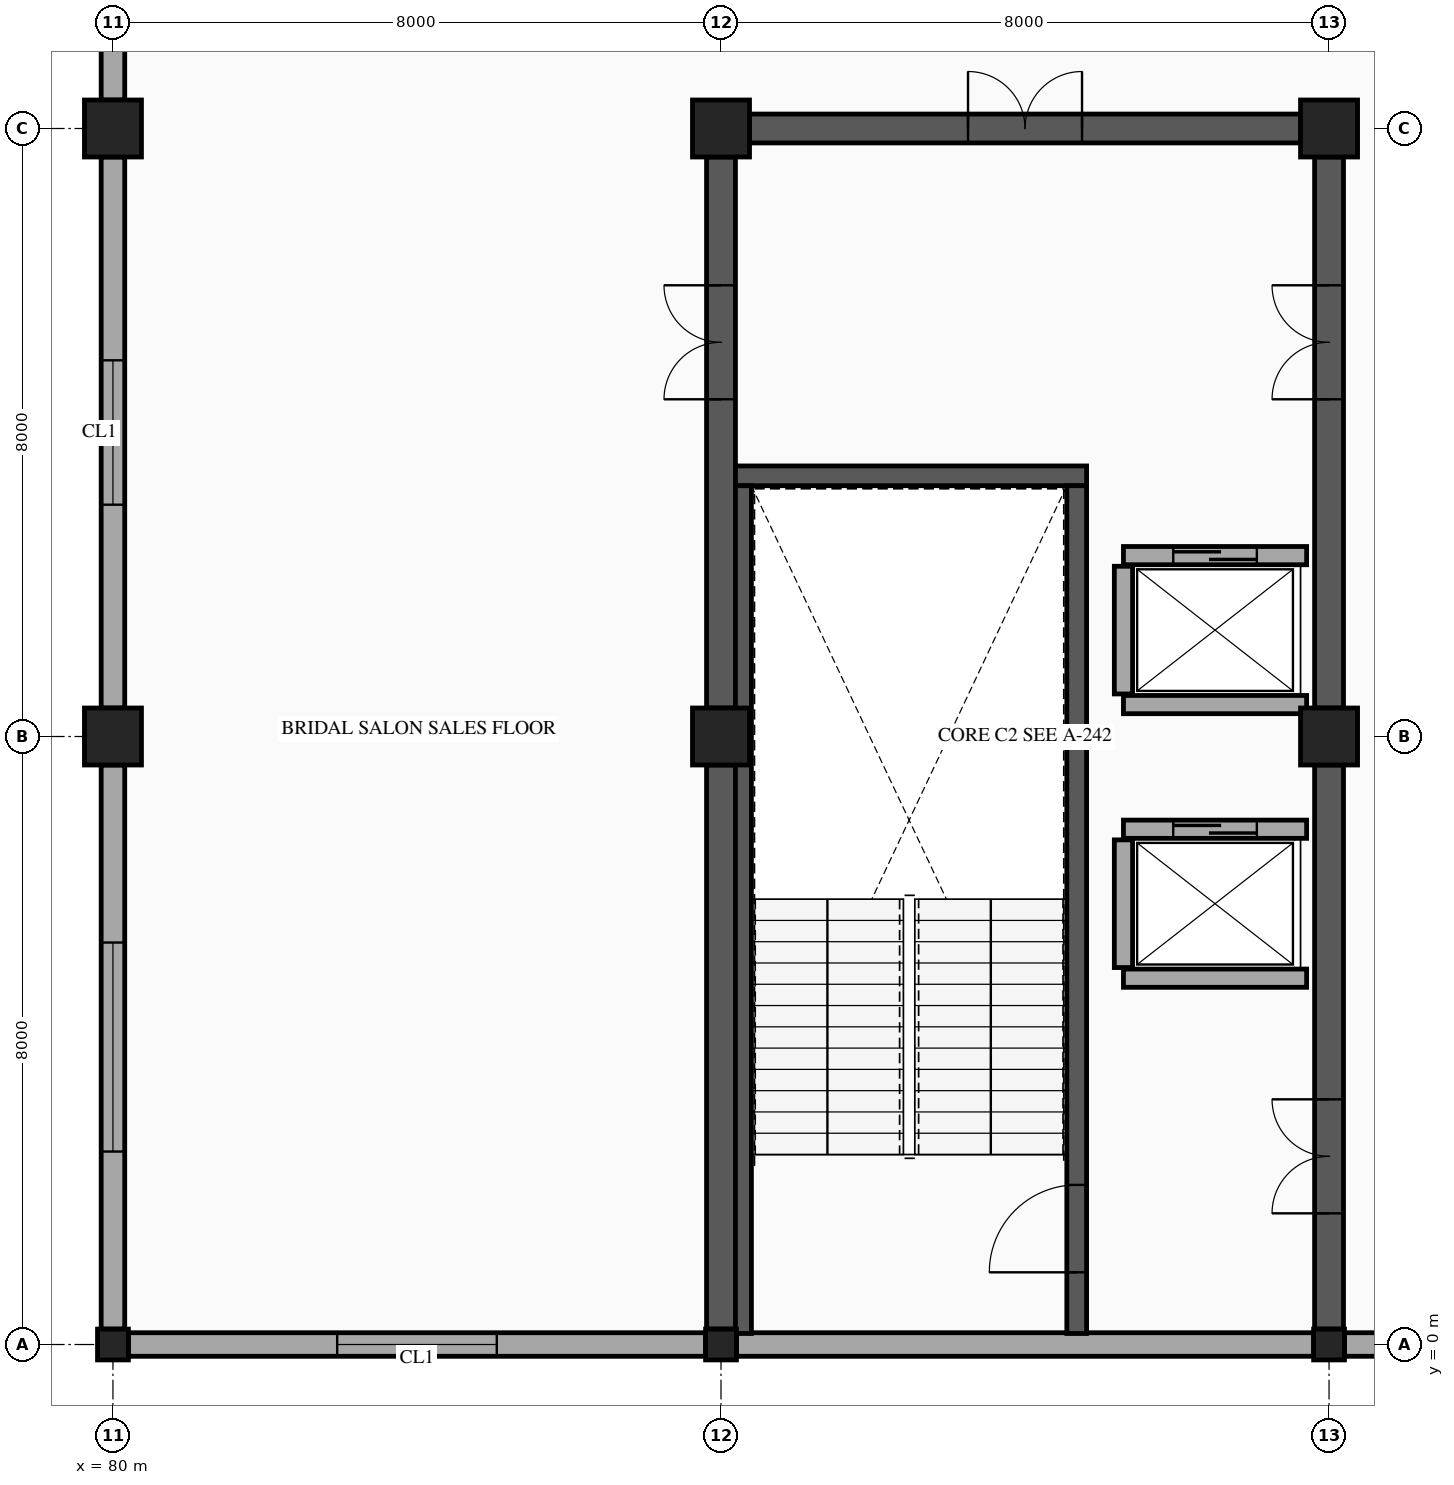
"""IFC4 building model, lengths in metres.
Left out: names, types, materials, properties, quantities, classifications, styles, units other than length and angle.
Written with IfcOpenShell. Run it as: python <this file> out.ifc"""

import sys

from ifc_helpers import new_model, si_unit, direction, frame, frame_2d, origin, origin_2d, place, context, subcontext, project, spatial, rectangle, hollow_rectangle, extrude, element, fill, save


model = new_model("IFC4")
c1 = context("Model", 3, precision=1e-05, world=origin(), true_north=direction((0.0, 1.0)))
c2 = subcontext(c1, "Body", "Model", "MODEL_VIEW")
j1 = project(units=[si_unit("LENGTHUNIT", "METRE"), si_unit("PLANEANGLEUNIT", "RADIAN")], contexts=[c1])
p1 = place(None, origin())
s1 = spatial("IfcSite", under=j1, at=p1, CompositionType="ELEMENT")
p2 = place(p1, origin())
s2 = spatial("IfcBuilding", under=s1, at=p2, CompositionType="ELEMENT")
p3 = place(p2, frame((0.0, 0.0, 14.9)))
s3 = spatial("IfcBuildingStorey", under=s2, at=p3, CompositionType="ELEMENT", Elevation=14.9)
p4 = place(p3, frame((80.0, 0.0, 0.0), z_axis=(0.0, 0.0, 1.0), x_axis=(1.0, 0.0, 0.0)))
e1 = element("IfcColumn", 1, at=p4, inside=s3, PredefinedType="COLUMN", context=c2, shape_type="SweptSolid", body=[
    extrude(hollow_rectangle(XDim=0.406, YDim=0.406, WallThickness=0.015, InnerFilletRadius=0.015, OuterFilletRadius=0.029, at=origin_2d()), origin(), (0.0, 0.0, 1.0), 4.5),
])
for number, where, z_axis, x_axis in (
    (2, (80.0, 8.0, 0.0), (0.0, 0.0, 1.0), (1.0, 0.0, 0.0)),
    (3, (80.0, 16.0, 0.0), (0.0, 0.0, 1.0), (1.0, 0.0, 0.0)),
):
    element("IfcColumn", number, at=place(p3, frame(where, z_axis=z_axis, x_axis=x_axis)), inside=s3, PredefinedType="COLUMN", context=c2, shape_type="SweptSolid", body=[
        extrude(rectangle(XDim=0.75, YDim=0.75, at=origin_2d()), origin(), (0.0, 0.0, 1.0), 4.5),
    ])
p5 = place(p3, frame((88.0, 0.0, 0.0), z_axis=(0.0, 0.0, 1.0), x_axis=(1.0, 0.0, 0.0)))
e4 = element("IfcColumn", 4, at=p5, inside=s3, PredefinedType="COLUMN", context=c2, shape_type="SweptSolid", body=[
    extrude(hollow_rectangle(XDim=0.406, YDim=0.406, WallThickness=0.015, InnerFilletRadius=0.015, OuterFilletRadius=0.029, at=origin_2d()), origin(), (0.0, 0.0, 1.0), 4.5),
])
for number, where, z_axis, x_axis in (
    (5, (88.0, 8.0, 0.0), (0.0, 0.0, 1.0), (1.0, 0.0, 0.0)),
    (6, (88.0, 16.0, 0.0), (0.0, 0.0, 1.0), (1.0, 0.0, 0.0)),
):
    element("IfcColumn", number, at=place(p3, frame(where, z_axis=z_axis, x_axis=x_axis)), inside=s3, PredefinedType="COLUMN", context=c2, shape_type="SweptSolid", body=[
        extrude(rectangle(XDim=0.75, YDim=0.75, at=origin_2d()), origin(), (0.0, 0.0, 1.0), 4.5),
    ])
p6 = place(p3, frame((96.0, 0.0, 0.0), z_axis=(0.0, 0.0, 1.0), x_axis=(1.0, 0.0, 0.0)))
e7 = element("IfcColumn", 7, at=p6, inside=s3, PredefinedType="COLUMN", context=c2, shape_type="SweptSolid", body=[
    extrude(hollow_rectangle(XDim=0.406, YDim=0.406, WallThickness=0.015, InnerFilletRadius=0.015, OuterFilletRadius=0.029, at=origin_2d()), origin(), (0.0, 0.0, 1.0), 4.5),
])
for number, where, z_axis, x_axis in (
    (8, (96.0, 8.0, 0.0), (0.0, 0.0, 1.0), (1.0, 0.0, 0.0)),
    (9, (96.0, 16.0, 0.0), (0.0, 0.0, 1.0), (1.0, 0.0, 0.0)),
):
    element("IfcColumn", number, at=place(p3, frame(where, z_axis=z_axis, x_axis=x_axis)), inside=s3, PredefinedType="COLUMN", context=c2, shape_type="SweptSolid", body=[
        extrude(rectangle(XDim=0.75, YDim=0.75, at=origin_2d()), origin(), (0.0, 0.0, 1.0), 4.5),
    ])
p7 = place(p3, frame((103.797, 0.0, 0.0), z_axis=(0.0, 0.0, 1.0), x_axis=(-1.0, 0.0, 0.0)))
e10 = element("IfcWall", 10, at=p7, inside=s3, PredefinedType="STANDARD", context=c2, shape_type="SweptSolid", body=[
    extrude(rectangle(XDim=7.594, YDim=0.31, at=frame_2d((3.797, 0.0))), origin(), (0.0, 0.0, 1.0), 3.48),
])
p8 = place(p7, frame((2.747, 0.0, 0.8)))
e11 = element("IfcOpeningElement", 11, at=p8, cuts=e10, PredefinedType="OPENING", context=c2, shape_type="SweptSolid", body=[
    extrude(rectangle(XDim=2.1, YDim=1.9, at=frame_2d((1.05, 0.95))), frame((0.0, 0.165, 0.0), z_axis=(0.0, -1.0, 0.0), x_axis=(1.0, 0.0, 0.0)), (0.0, 0.0, 1.0), 0.33),
])
p9 = place(p3, frame((95.797, 0.0, 0.0), z_axis=(0.0, 0.0, 1.0), x_axis=(-1.0, 0.0, 0.0)))
e12 = element("IfcWall", 12, at=p9, inside=s3, PredefinedType="STANDARD", context=c2, shape_type="SweptSolid", body=[
    extrude(rectangle(XDim=7.594, YDim=0.31, at=frame_2d((3.797, 0.0))), origin(), (0.0, 0.0, 1.0), 3.48),
])
p10 = place(p3, frame((87.797, 0.0, 0.0), z_axis=(0.0, 0.0, 1.0), x_axis=(-1.0, 0.0, 0.0)))
e13 = element("IfcWall", 13, at=p10, inside=s3, PredefinedType="STANDARD", context=c2, shape_type="SweptSolid", body=[
    extrude(rectangle(XDim=7.594, YDim=0.31, at=frame_2d((3.797, 0.0))), origin(), (0.0, 0.0, 1.0), 3.48),
])
p11 = place(p10, frame((2.747, 0.0, 0.8)))
e14 = element("IfcOpeningElement", 14, at=p11, cuts=e13, PredefinedType="OPENING", context=c2, shape_type="SweptSolid", body=[
    extrude(rectangle(XDim=2.1, YDim=1.9, at=frame_2d((1.05, 0.95))), frame((0.0, 0.165, 0.0), z_axis=(0.0, -1.0, 0.0), x_axis=(1.0, 0.0, 0.0)), (0.0, 0.0, 1.0), 0.33),
])
p12 = place(p3, frame((80.0, 0.203, 0.0), z_axis=(0.0, 0.0, 1.0), x_axis=(0.0, 1.0, 0.0)))
e15 = element("IfcWall", 15, at=p12, inside=s3, PredefinedType="STANDARD", context=c2, shape_type="SweptSolid", body=[
    extrude(rectangle(XDim=7.422, YDim=0.31, at=frame_2d((3.711, 0.0))), origin(), (0.0, 0.0, 1.0), 3.48),
])
p13 = place(p12, frame((2.336, 0.0, 0.8)))
e16 = element("IfcOpeningElement", 16, at=p13, cuts=e15, PredefinedType="OPENING", context=c2, shape_type="SweptSolid", body=[
    extrude(rectangle(XDim=2.75, YDim=2.15, at=frame_2d((1.375, 1.075))), frame((0.0, 0.165, 0.0), z_axis=(0.0, -1.0, 0.0), x_axis=(1.0, 0.0, 0.0)), (0.0, 0.0, 1.0), 0.33),
])
p14 = place(p3, frame((80.0, 8.375, 0.0), z_axis=(0.0, 0.0, 1.0), x_axis=(0.0, 1.0, 0.0)))
e17 = element("IfcWall", 17, at=p14, inside=s3, PredefinedType="STANDARD", context=c2, shape_type="SweptSolid", body=[
    extrude(rectangle(XDim=7.25, YDim=0.31, at=frame_2d((3.625, 0.0))), origin(), (0.0, 0.0, 1.0), 3.48),
])
p15 = place(p14, frame((2.675, 0.0, 0.8)))
e18 = element("IfcOpeningElement", 18, at=p15, cuts=e17, PredefinedType="OPENING", context=c2, shape_type="SweptSolid", body=[
    extrude(rectangle(XDim=1.9, YDim=1.65, at=frame_2d((0.95, 0.825))), frame((0.0, 0.165, 0.0), z_axis=(0.0, -1.0, 0.0), x_axis=(1.0, 0.0, 0.0)), (0.0, 0.0, 1.0), 0.33),
])
p16 = place(p3, frame((80.0, 16.375, 0.0), z_axis=(0.0, 0.0, 1.0), x_axis=(0.0, 1.0, 0.0)))
e19 = element("IfcWall", 19, at=p16, inside=s3, PredefinedType="STANDARD", context=c2, shape_type="SweptSolid", body=[
    extrude(rectangle(XDim=7.3, YDim=0.31, at=frame_2d((3.65, 0.0))), origin(), (0.0, 0.0, 1.0), 3.48),
])
p17 = place(p3, frame((88.14, 11.43, 0.0), z_axis=(0.0, 0.0, 1.0), x_axis=(1.0, 0.0, 0.0)))
e20 = element("IfcWall", 20, at=p17, inside=s3, PredefinedType="SHEAR", context=c2, shape_type="SweptSolid", body=[
    extrude(rectangle(XDim=4.67, YDim=0.26, at=frame_2d((2.335, 0.0))), origin(), (0.0, 0.0, 1.0), 4.28),
])
p18 = place(p3, frame((88.27, 0.145, 0.0), z_axis=(0.0, 0.0, 1.0), x_axis=(0.0, 1.0, 0.0)))
e21 = element("IfcWall", 21, at=p18, inside=s3, PredefinedType="SHEAR", context=c2, shape_type="SweptSolid", body=[
    extrude(rectangle(XDim=11.155, YDim=0.26, at=frame_2d((5.578, 0.0))), origin(), (0.0, 0.0, 1.0), 4.28),
])
p19 = place(p3, frame((92.68, 0.145, 0.0), z_axis=(0.0, 0.0, 1.0), x_axis=(0.0, 1.0, 0.0)))
e22 = element("IfcWall", 22, at=p19, inside=s3, PredefinedType="SHEAR", context=c2, shape_type="SweptSolid", body=[
    extrude(rectangle(XDim=11.155, YDim=0.26, at=frame_2d((5.578, 0.0))), origin(), (0.0, 0.0, 1.0), 4.28),
])
p20 = place(p19, frame((0.805, 0.0, 0.0)))
e23 = element("IfcOpeningElement", 23, at=p20, cuts=e22, PredefinedType="OPENING", context=c2, shape_type="SweptSolid", body=[
    extrude(rectangle(XDim=1.15, YDim=2.15, at=frame_2d((0.575, 1.075))), frame((0.0, 0.14, 0.0), z_axis=(0.0, -1.0, 0.0), x_axis=(1.0, 0.0, 0.0)), (0.0, 0.0, 1.0), 0.28),
])
p21 = place(p3, frame((88.375, 16.0, 0.0), z_axis=(0.0, 0.0, 1.0), x_axis=(1.0, 0.0, 0.0)))
e24 = element("IfcWall", 24, at=p21, inside=s3, PredefinedType="SHEAR", context=c2, shape_type="SweptSolid", body=[
    extrude(rectangle(XDim=7.25, YDim=0.38, at=frame_2d((3.625, 0.0))), origin(), (0.0, 0.0, 1.0), 4.28),
])
p22 = place(p21, frame((2.875, 0.0, 0.0)))
e25 = element("IfcOpeningElement", 25, at=p22, cuts=e24, PredefinedType="OPENING", context=c2, shape_type="SweptSolid", body=[
    extrude(rectangle(XDim=1.5, YDim=2.15, at=frame_2d((0.75, 1.075))), frame((0.0, 0.2, 0.0), z_axis=(0.0, -1.0, 0.0), x_axis=(1.0, 0.0, 0.0)), (0.0, 0.0, 1.0), 0.4),
])
p23 = place(p3, frame((88.0, 0.203, 0.0), z_axis=(0.0, 0.0, 1.0), x_axis=(0.0, 1.0, 0.0)))
e26 = element("IfcWall", 26, at=p23, inside=s3, PredefinedType="SHEAR", context=c2, shape_type="SweptSolid", body=[
    extrude(rectangle(XDim=7.422, YDim=0.38, at=frame_2d((3.711, 0.0))), origin(), (0.0, 0.0, 1.0), 4.28),
])
p24 = place(p3, frame((88.0, 8.375, 0.0), z_axis=(0.0, 0.0, 1.0), x_axis=(0.0, 1.0, 0.0)))
e27 = element("IfcWall", 27, at=p24, inside=s3, PredefinedType="SHEAR", context=c2, shape_type="SweptSolid", body=[
    extrude(rectangle(XDim=7.25, YDim=0.38, at=frame_2d((3.625, 0.0))), origin(), (0.0, 0.0, 1.0), 4.28),
])
p25 = place(p24, frame((4.062, 0.0, 0.0)))
e28 = element("IfcOpeningElement", 28, at=p25, cuts=e27, PredefinedType="OPENING", context=c2, shape_type="SweptSolid", body=[
    extrude(rectangle(XDim=1.5, YDim=2.15, at=frame_2d((0.75, 1.075))), frame((0.0, 0.2, 0.0), z_axis=(0.0, -1.0, 0.0), x_axis=(1.0, 0.0, 0.0)), (0.0, 0.0, 1.0), 0.4),
])
p26 = place(p3, frame((96.0, 0.203, 0.0), z_axis=(0.0, 0.0, 1.0), x_axis=(0.0, 1.0, 0.0)))
e29 = element("IfcWall", 29, at=p26, inside=s3, PredefinedType="SHEAR", context=c2, shape_type="SweptSolid", body=[
    extrude(rectangle(XDim=7.422, YDim=0.38, at=frame_2d((3.711, 0.0))), origin(), (0.0, 0.0, 1.0), 4.28),
])
p27 = place(p26, frame((1.523, 0.0, 0.0)))
e30 = element("IfcOpeningElement", 30, at=p27, cuts=e29, PredefinedType="OPENING", context=c2, shape_type="SweptSolid", body=[
    extrude(rectangle(XDim=1.5, YDim=2.15, at=frame_2d((0.75, 1.075))), frame((0.0, 0.2, 0.0), z_axis=(0.0, -1.0, 0.0), x_axis=(1.0, 0.0, 0.0)), (0.0, 0.0, 1.0), 0.4),
])
p28 = place(p3, frame((96.0, 8.375, 0.0), z_axis=(0.0, 0.0, 1.0), x_axis=(0.0, 1.0, 0.0)))
e31 = element("IfcWall", 31, at=p28, inside=s3, PredefinedType="SHEAR", context=c2, shape_type="SweptSolid", body=[
    extrude(rectangle(XDim=7.25, YDim=0.38, at=frame_2d((3.625, 0.0))), origin(), (0.0, 0.0, 1.0), 4.28),
])
p29 = place(p28, frame((4.062, 0.0, 0.0)))
e32 = element("IfcOpeningElement", 32, at=p29, cuts=e31, PredefinedType="OPENING", context=c2, shape_type="SweptSolid", body=[
    extrude(rectangle(XDim=1.5, YDim=2.15, at=frame_2d((0.75, 1.075))), frame((0.0, 0.2, 0.0), z_axis=(0.0, -1.0, 0.0), x_axis=(1.0, 0.0, 0.0)), (0.0, 0.0, 1.0), 0.4),
])
p30 = place(p3, frame((93.295, 6.78, 0.0), z_axis=(0.0, 0.0, 1.0), x_axis=(1.0, 0.0, 0.0)))
e33 = element("IfcWall", 33, at=p30, inside=s3, PredefinedType="PARTITIONING", context=c2, shape_type="SweptSolid", body=[
    extrude(rectangle(XDim=2.41, YDim=0.24, at=frame_2d((1.205, 0.0))), origin(), (0.0, 0.0, 1.0), 4.28),
])
p31 = place(p30, frame((0.655, 0.0, 0.0)))
e34 = element("IfcOpeningElement", 34, at=p31, cuts=e33, PredefinedType="OPENING", context=c2, shape_type="SweptSolid", body=[
    extrude(rectangle(XDim=1.1, YDim=2.15, at=frame_2d((0.55, 1.075))), frame((0.0, 0.13, 0.0), z_axis=(0.0, -1.0, 0.0), x_axis=(1.0, 0.0, 0.0)), (0.0, 0.0, 1.0), 0.26),
])
p32 = place(p3, frame((93.295, 4.82, 0.0), z_axis=(0.0, 0.0, 1.0), x_axis=(1.0, 0.0, 0.0)))
e35 = element("IfcWall", 35, at=p32, inside=s3, PredefinedType="PARTITIONING", context=c2, shape_type="SweptSolid", body=[
    extrude(rectangle(XDim=2.41, YDim=0.24, at=frame_2d((1.205, 0.0))), origin(), (0.0, 0.0, 1.0), 4.28),
])
p33 = place(p3, frame((93.295, 4.96, 0.0), z_axis=(0.0, 0.0, 1.0), x_axis=(0.0, 1.0, 0.0)))
e36 = element("IfcWall", 36, at=p33, inside=s3, PredefinedType="PARTITIONING", context=c2, shape_type="SweptSolid", body=[
    extrude(rectangle(XDim=1.68, YDim=0.24, at=frame_2d((0.84, 0.0))), origin(), (0.0, 0.0, 1.0), 4.28),
])
p34 = place(p3, frame((93.295, 10.38, 0.0), z_axis=(0.0, 0.0, 1.0), x_axis=(1.0, 0.0, 0.0)))
e37 = element("IfcWall", 37, at=p34, inside=s3, PredefinedType="PARTITIONING", context=c2, shape_type="SweptSolid", body=[
    extrude(rectangle(XDim=2.41, YDim=0.24, at=frame_2d((1.205, 0.0))), origin(), (0.0, 0.0, 1.0), 4.28),
])
p35 = place(p34, frame((0.655, 0.0, 0.0)))
e38 = element("IfcOpeningElement", 38, at=p35, cuts=e37, PredefinedType="OPENING", context=c2, shape_type="SweptSolid", body=[
    extrude(rectangle(XDim=1.1, YDim=2.15, at=frame_2d((0.55, 1.075))), frame((0.0, 0.13, 0.0), z_axis=(0.0, -1.0, 0.0), x_axis=(1.0, 0.0, 0.0)), (0.0, 0.0, 1.0), 0.26),
])
p36 = place(p3, frame((93.295, 8.42, 0.0), z_axis=(0.0, 0.0, 1.0), x_axis=(1.0, 0.0, 0.0)))
e39 = element("IfcWall", 39, at=p36, inside=s3, PredefinedType="PARTITIONING", context=c2, shape_type="SweptSolid", body=[
    extrude(rectangle(XDim=2.41, YDim=0.24, at=frame_2d((1.205, 0.0))), origin(), (0.0, 0.0, 1.0), 4.28),
])
p37 = place(p3, frame((93.295, 8.56, 0.0), z_axis=(0.0, 0.0, 1.0), x_axis=(0.0, 1.0, 0.0)))
e40 = element("IfcWall", 40, at=p37, inside=s3, PredefinedType="PARTITIONING", context=c2, shape_type="SweptSolid", body=[
    extrude(rectangle(XDim=1.68, YDim=0.24, at=frame_2d((0.84, 0.0))), origin(), (0.0, 0.0, 1.0), 4.28),
])
p38 = place(p11, origin())
e41 = element("IfcWindow", 41, at=p38, inside=s3, PartitioningType="DOUBLE_PANEL_VERTICAL", PredefinedType="WINDOW", context=c2, shape_type="SweptSolid", body=[
    extrude(rectangle(XDim=2.1, YDim=1.9, at=frame_2d((1.05, 0.95))), frame((0.0, 0.03, 0.0), z_axis=(0.0, -1.0, 0.0), x_axis=(1.0, 0.0, 0.0)), (0.0, 0.0, 1.0), 0.06),
])
fill(e14, e41)
p39 = place(p13, origin())
e42 = element("IfcWindow", 42, at=p39, inside=s3, PartitioningType="TRIPLE_PANEL_VERTICAL", PredefinedType="WINDOW", context=c2, shape_type="SweptSolid", body=[
    extrude(rectangle(XDim=2.75, YDim=2.15, at=frame_2d((1.375, 1.075))), frame((0.0, 0.03, 0.0), z_axis=(0.0, -1.0, 0.0), x_axis=(1.0, 0.0, 0.0)), (0.0, 0.0, 1.0), 0.06),
])
fill(e16, e42)
p40 = place(p15, origin())
e43 = element("IfcWindow", 43, at=p40, inside=s3, PartitioningType="DOUBLE_PANEL_VERTICAL", PredefinedType="WINDOW", context=c2, shape_type="SweptSolid", body=[
    extrude(rectangle(XDim=1.9, YDim=1.65, at=frame_2d((0.95, 0.825))), frame((0.0, 0.03, 0.0), z_axis=(0.0, -1.0, 0.0), x_axis=(1.0, 0.0, 0.0)), (0.0, 0.0, 1.0), 0.06),
])
fill(e18, e43)
p41 = place(p20, origin())
e44 = element("IfcDoor", 44, at=p41, inside=s3, OperationType="SINGLE_SWING_LEFT", PredefinedType="DOOR", context=c2, shape_type="SweptSolid", body=[
    extrude(rectangle(XDim=1.15, YDim=2.15, at=frame_2d((0.575, 1.075))), frame((0.0, 0.025, 0.0), z_axis=(0.0, -1.0, 0.0), x_axis=(1.0, 0.0, 0.0)), (0.0, 0.0, 1.0), 0.05),
])
fill(e23, e44)
p42 = place(p22, origin())
e45 = element("IfcDoor", 45, at=p42, inside=s3, OperationType="DOUBLE_DOOR_SINGLE_SWING", PredefinedType="DOOR", context=c2, shape_type="SweptSolid", body=[
    extrude(rectangle(XDim=1.5, YDim=2.15, at=frame_2d((0.75, 1.075))), frame((0.0, 0.025, 0.0), z_axis=(0.0, -1.0, 0.0), x_axis=(1.0, 0.0, 0.0)), (0.0, 0.0, 1.0), 0.05),
])
fill(e25, e45)
p43 = place(p25, origin())
e46 = element("IfcDoor", 46, at=p43, inside=s3, OperationType="DOUBLE_DOOR_SINGLE_SWING", PredefinedType="DOOR", context=c2, shape_type="SweptSolid", body=[
    extrude(rectangle(XDim=1.5, YDim=2.15, at=frame_2d((0.75, 1.075))), frame((0.0, 0.025, 0.0), z_axis=(0.0, -1.0, 0.0), x_axis=(1.0, 0.0, 0.0)), (0.0, 0.0, 1.0), 0.05),
])
fill(e28, e46)
p44 = place(p27, origin())
e47 = element("IfcDoor", 47, at=p44, inside=s3, OperationType="DOUBLE_DOOR_SINGLE_SWING", PredefinedType="DOOR", context=c2, shape_type="SweptSolid", body=[
    extrude(rectangle(XDim=1.5, YDim=2.15, at=frame_2d((0.75, 1.075))), frame((0.0, 0.025, 0.0), z_axis=(0.0, -1.0, 0.0), x_axis=(1.0, 0.0, 0.0)), (0.0, 0.0, 1.0), 0.05),
])
fill(e30, e47)
p45 = place(p29, origin())
e48 = element("IfcDoor", 48, at=p45, inside=s3, OperationType="DOUBLE_DOOR_SINGLE_SWING", PredefinedType="DOOR", context=c2, shape_type="SweptSolid", body=[
    extrude(rectangle(XDim=1.5, YDim=2.15, at=frame_2d((0.75, 1.075))), frame((0.0, 0.025, 0.0), z_axis=(0.0, -1.0, 0.0), x_axis=(1.0, 0.0, 0.0)), (0.0, 0.0, 1.0), 0.05),
])
fill(e32, e48)
p46 = place(p31, origin())
e49 = element("IfcDoor", 49, at=p46, inside=s3, OperationType="SLIDING_TO_LEFT", PredefinedType="DOOR", context=c2, shape_type="SweptSolid", body=[
    extrude(rectangle(XDim=1.1, YDim=2.15, at=frame_2d((0.55, 1.075))), frame((0.0, 0.025, 0.0), z_axis=(0.0, -1.0, 0.0), x_axis=(1.0, 0.0, 0.0)), (0.0, 0.0, 1.0), 0.05),
])
fill(e34, e49)
p47 = place(p35, origin())
e50 = element("IfcDoor", 50, at=p47, inside=s3, OperationType="SLIDING_TO_LEFT", PredefinedType="DOOR", context=c2, shape_type="SweptSolid", body=[
    extrude(rectangle(XDim=1.1, YDim=2.15, at=frame_2d((0.55, 1.075))), frame((0.0, 0.025, 0.0), z_axis=(0.0, -1.0, 0.0), x_axis=(1.0, 0.0, 0.0)), (0.0, 0.0, 1.0), 0.05),
])
fill(e38, e50)
save(model, sys.argv[1])
